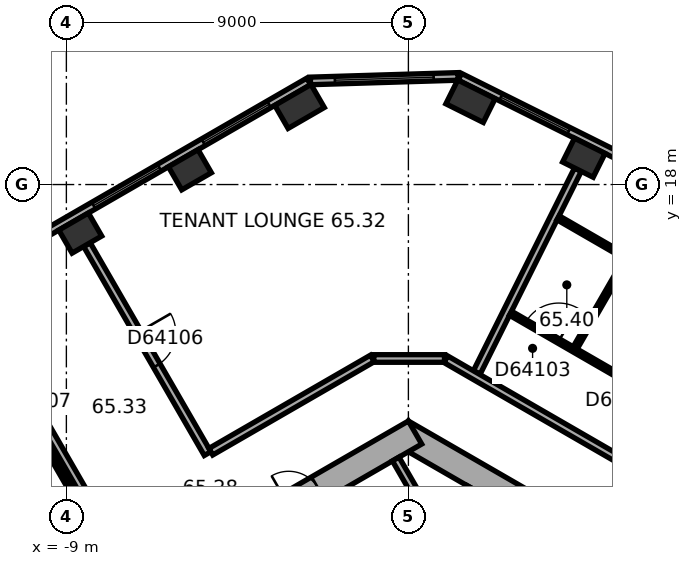
"""IFC4 building model, lengths in metres.
Left out: names, types, materials, properties, quantities, classifications, styles, units other than length and angle.
Written with IfcOpenShell. Run it as: python <this file> out.ifc"""

import sys

from ifc_helpers import new_model, si_unit, direction, frame, frame_2d, origin, origin_2d, place, context, subcontext, project, spatial, rectangle, extrude, element, fill, save


model = new_model("IFC4")
c1 = context("Model", 3, precision=1e-05, world=origin(), true_north=direction((0.0, 1.0)))
c2 = subcontext(c1, "Body", "Model", "MODEL_VIEW")
j1 = project(units=[si_unit("LENGTHUNIT", "METRE"), si_unit("PLANEANGLEUNIT", "RADIAN")], contexts=[c1])
p1 = place(None, origin())
s1 = spatial("IfcSite", under=j1, at=p1, CompositionType="ELEMENT")
p2 = place(p1, origin())
s2 = spatial("IfcBuilding", under=s1, at=p2, CompositionType="ELEMENT")
p3 = place(p2, frame((0.0, 0.0, 263.5)))
s3 = spatial("IfcBuildingStorey", under=s2, at=p3, CompositionType="ELEMENT", Elevation=263.5)
p4 = place(p3, frame((4.616, 18.706, 0.0), z_axis=(0.0, 0.0, 1.0), x_axis=(-0.894934361602, 0.44619781311, 0.0)))
e1 = element("IfcColumn", 1, at=p4, inside=s3, PredefinedType="COLUMN", context=c2, shape_type="SweptSolid", body=[
    extrude(rectangle(XDim=0.9, YDim=0.7, at=origin_2d()), origin(), (0.0, 0.0, 1.0), 3.7),
])
for number, where, z_axis, x_axis in (
    (2, (1.635, 20.192, 0.0), (0.0, 0.0, 1.0), (-0.895, 0.446, 0.0)),
    (3, (-2.864, 20.055, 0.0), (0.0, 0.0, 1.0), (-0.866, -0.5, 0.0)),
):
    element("IfcColumn", number, at=place(p3, frame(where, z_axis=z_axis, x_axis=x_axis)), inside=s3, PredefinedType="COLUMN", context=c2, shape_type="SweptSolid", body=[
        extrude(rectangle(XDim=1.1, YDim=0.7, at=origin_2d()), origin(), (0.0, 0.0, 1.0), 3.7),
    ])
for number, where, z_axis, x_axis in (
    (4, (-5.75, 18.389, 0.0), (0.0, 0.0, 1.0), (-0.866, -0.5, 0.0)),
    (5, (-8.635, 16.723, 0.0), (0.0, 0.0, 1.0), (-0.866, -0.5, 0.0)),
):
    element("IfcColumn", number, at=place(p3, frame(where, z_axis=z_axis, x_axis=x_axis)), inside=s3, PredefinedType="COLUMN", context=c2, shape_type="SweptSolid", body=[
        extrude(rectangle(XDim=0.9, YDim=0.7, at=origin_2d()), origin(), (0.0, 0.0, 1.0), 3.7),
    ])
p5 = place(p3, frame((10.025, 5.586, 0.0), z_axis=(0.0, 0.0, 1.0), x_axis=(-0.866026453023, 0.499998182661, 0.0)))
e6 = element("IfcWall", 6, at=p5, inside=s3, PredefinedType="SHEAR", context=c2, shape_type="SweptSolid", body=[
    extrude(rectangle(XDim=11.778, YDim=0.7, at=frame_2d((5.889, 0.0))), origin(), (0.0, 0.0, 1.0), 3.7),
])
p6 = place(p5, frame((5.139, 0.0, 0.0)))
e7 = element("IfcOpeningElement", 7, at=p6, cuts=e6, PredefinedType="OPENING", context=c2, shape_type="SweptSolid", body=[
    extrude(rectangle(XDim=0.9, YDim=2.1, at=frame_2d((0.45, 1.05))), frame((0.0, 0.36, 0.0), z_axis=(0.0, -1.0, 0.0), x_axis=(1.0, 0.0, 0.0)), (0.0, 0.0, 1.0), 0.72),
])
p7 = place(p3, frame((0.175, 11.475, 0.0), z_axis=(0.0, 0.0, 1.0), x_axis=(-0.866026453023, -0.499998182661, 0.0)))
e8 = element("IfcWall", 8, at=p7, inside=s3, PredefinedType="SHEAR", context=c2, shape_type="SweptSolid", body=[
    extrude(rectangle(XDim=11.778, YDim=0.7, at=frame_2d((5.889, 0.0))), origin(), (0.0, 0.0, 1.0), 3.7),
])
p8 = place(p7, frame((6.089, 0.0, 0.0)))
e9 = element("IfcOpeningElement", 9, at=p8, cuts=e8, PredefinedType="OPENING", context=c2, shape_type="SweptSolid", body=[
    extrude(rectangle(XDim=1.5, YDim=2.1, at=frame_2d((0.75, 1.05))), frame((0.0, 0.36, 0.0), z_axis=(0.0, -1.0, 0.0), x_axis=(1.0, 0.0, 0.0)), (0.0, 0.0, 1.0), 0.72),
])
p9 = place(p7, frame((2.939, 0.0, 0.0)))
e10 = element("IfcOpeningElement", 10, at=p9, cuts=e8, PredefinedType="OPENING", context=c2, shape_type="SweptSolid", body=[
    extrude(rectangle(XDim=0.9, YDim=2.1, at=frame_2d((0.45, 1.05))), frame((0.0, 0.36, 0.0), z_axis=(0.0, -1.0, 0.0), x_axis=(1.0, 0.0, 0.0)), (0.0, 0.0, 1.0), 0.72),
])
p10 = place(p3, frame((17.223, 12.923, 0.0), z_axis=(0.0, 0.0, 1.0), x_axis=(-0.894930561148, 0.44620543556, 0.0)))
e11 = element("IfcWall", 11, at=p10, inside=s3, PredefinedType="STANDARD", context=c2, shape_type="SweptSolid", body=[
    extrude(rectangle(XDim=17.731, YDim=0.2, at=frame_2d((8.866, 0.0))), origin(), (0.0, 0.0, 1.0), 3.7),
])
p11 = place(p10, frame((1.202, 0.0, 0.9)))
e12 = element("IfcOpeningElement", 12, at=p11, cuts=e11, PredefinedType="OPENING", context=c2, shape_type="SweptSolid", body=[
    extrude(rectangle(XDim=2.0, YDim=2.0, at=frame_2d((1.0, 1.0))), frame((0.0, 0.11, 0.0), z_axis=(0.0, -1.0, 0.0), x_axis=(1.0, 0.0, 0.0)), (0.0, 0.0, 1.0), 0.22),
])
p12 = place(p10, frame((4.533, 0.0, 0.9)))
e13 = element("IfcOpeningElement", 13, at=p12, cuts=e11, PredefinedType="OPENING", context=c2, shape_type="SweptSolid", body=[
    extrude(rectangle(XDim=2.0, YDim=2.0, at=frame_2d((1.0, 1.0))), frame((0.0, 0.11, 0.0), z_axis=(0.0, -1.0, 0.0), x_axis=(1.0, 0.0, 0.0)), (0.0, 0.0, 1.0), 0.22),
])
p13 = place(p10, frame((7.865, 0.0, 0.9)))
e14 = element("IfcOpeningElement", 14, at=p13, cuts=e11, PredefinedType="OPENING", context=c2, shape_type="SweptSolid", body=[
    extrude(rectangle(XDim=2.0, YDim=2.0, at=frame_2d((1.0, 1.0))), frame((0.0, 0.11, 0.0), z_axis=(0.0, -1.0, 0.0), x_axis=(1.0, 0.0, 0.0)), (0.0, 0.0, 1.0), 0.22),
])
p14 = place(p10, frame((11.197, 0.0, 0.9)))
e15 = element("IfcOpeningElement", 15, at=p14, cuts=e11, PredefinedType="OPENING", context=c2, shape_type="SweptSolid", body=[
    extrude(rectangle(XDim=2.0, YDim=2.0, at=frame_2d((1.0, 1.0))), frame((0.0, 0.11, 0.0), z_axis=(0.0, -1.0, 0.0), x_axis=(1.0, 0.0, 0.0)), (0.0, 0.0, 1.0), 0.22),
])
p15 = place(p10, frame((14.528, 0.0, 0.9)))
e16 = element("IfcOpeningElement", 16, at=p15, cuts=e11, PredefinedType="OPENING", context=c2, shape_type="SweptSolid", body=[
    extrude(rectangle(XDim=2.0, YDim=2.0, at=frame_2d((1.0, 1.0))), frame((0.0, 0.11, 0.0), z_axis=(0.0, -1.0, 0.0), x_axis=(1.0, 0.0, 0.0)), (0.0, 0.0, 1.0), 0.22),
])
p16 = place(p3, frame((1.307, 20.845, 0.0), z_axis=(0.0, 0.0, 1.0), x_axis=(-0.999533654813, -0.030536419175, 0.0)))
e17 = element("IfcWall", 17, at=p16, inside=s3, PredefinedType="STANDARD", context=c2, shape_type="SweptSolid", body=[
    extrude(rectangle(XDim=3.885, YDim=0.2, at=frame_2d((1.943, 0.0))), origin(), (0.0, 0.0, 1.0), 3.7),
])
p17 = place(p16, frame((0.643, 0.0, 0.9)))
e18 = element("IfcOpeningElement", 18, at=p17, cuts=e17, PredefinedType="OPENING", context=c2, shape_type="SweptSolid", body=[
    extrude(rectangle(XDim=2.6, YDim=2.0, at=frame_2d((1.3, 1.0))), frame((0.0, 0.11, 0.0), z_axis=(0.0, -1.0, 0.0), x_axis=(1.0, 0.0, 0.0)), (0.0, 0.0, 1.0), 0.22),
])
p18 = place(p3, frame((-2.624, 20.713, 0.0), z_axis=(0.0, 0.0, 1.0), x_axis=(-0.866026460444, -0.499998169808, 0.0)))
e19 = element("IfcWall", 19, at=p18, inside=s3, PredefinedType="STANDARD", context=c2, shape_type="SweptSolid", body=[
    extrude(rectangle(XDim=17.731, YDim=0.2, at=frame_2d((8.866, 0.0))), origin(), (0.0, 0.0, 1.0), 3.7),
])
p19 = place(p18, frame((1.203, 0.0, 0.9)))
e20 = element("IfcOpeningElement", 20, at=p19, cuts=e19, PredefinedType="OPENING", context=c2, shape_type="SweptSolid", body=[
    extrude(rectangle(XDim=2.0, YDim=2.0, at=frame_2d((1.0, 1.0))), frame((0.0, 0.11, 0.0), z_axis=(0.0, -1.0, 0.0), x_axis=(1.0, 0.0, 0.0)), (0.0, 0.0, 1.0), 0.22),
])
p20 = place(p18, frame((4.535, 0.0, 0.9)))
e21 = element("IfcOpeningElement", 21, at=p20, cuts=e19, PredefinedType="OPENING", context=c2, shape_type="SweptSolid", body=[
    extrude(rectangle(XDim=2.0, YDim=2.0, at=frame_2d((1.0, 1.0))), frame((0.0, 0.11, 0.0), z_axis=(0.0, -1.0, 0.0), x_axis=(1.0, 0.0, 0.0)), (0.0, 0.0, 1.0), 0.22),
])
p21 = place(p18, frame((7.867, 0.0, 0.9)))
e22 = element("IfcOpeningElement", 22, at=p21, cuts=e19, PredefinedType="OPENING", context=c2, shape_type="SweptSolid", body=[
    extrude(rectangle(XDim=2.0, YDim=2.0, at=frame_2d((1.0, 1.0))), frame((0.0, 0.11, 0.0), z_axis=(0.0, -1.0, 0.0), x_axis=(1.0, 0.0, 0.0)), (0.0, 0.0, 1.0), 0.22),
])
p22 = place(p18, frame((11.198, 0.0, 0.9)))
e23 = element("IfcOpeningElement", 23, at=p22, cuts=e19, PredefinedType="OPENING", context=c2, shape_type="SweptSolid", body=[
    extrude(rectangle(XDim=2.0, YDim=2.0, at=frame_2d((1.0, 1.0))), frame((0.0, 0.11, 0.0), z_axis=(0.0, -1.0, 0.0), x_axis=(1.0, 0.0, 0.0)), (0.0, 0.0, 1.0), 0.22),
])
p23 = place(p18, frame((14.53, 0.0, 0.9)))
e24 = element("IfcOpeningElement", 24, at=p23, cuts=e19, PredefinedType="OPENING", context=c2, shape_type="SweptSolid", body=[
    extrude(rectangle(XDim=2.0, YDim=2.0, at=frame_2d((1.0, 1.0))), frame((0.0, 0.11, 0.0), z_axis=(0.0, -1.0, 0.0), x_axis=(1.0, 0.0, 0.0)), (0.0, 0.0, 1.0), 0.22),
])
p24 = place(p3, frame((0.532, 8.122, 0.0), z_axis=(0.0, 0.0, 1.0), x_axis=(0.500077893725, 0.86598042715, 0.0)))
e25 = element("IfcWall", 25, at=p24, inside=s3, PredefinedType="PARTITIONING", context=c2, shape_type="SweptSolid", body=[
    extrude(rectangle(XDim=2.2, YDim=0.2, at=frame_2d((1.1, 0.0))), origin(), (0.0, 0.0, 1.0), 3.42),
])
p25 = place(p3, frame((0.767, 8.872, 0.0), z_axis=(0.0, 0.0, 1.0), x_axis=(-0.499994660107, 0.866028486751, 0.0)))
e26 = element("IfcWall", 26, at=p25, inside=s3, PredefinedType="PARTITIONING", context=c2, shape_type="SweptSolid", body=[
    extrude(rectangle(XDim=2.2, YDim=0.2, at=frame_2d((1.1, 0.0))), origin(), (0.0, 0.0, 1.0), 3.42),
])
p26 = place(p3, frame((-11.345, 14.754, 0.0), z_axis=(0.0, 0.0, 1.0), x_axis=(0.500005339912, -0.866022320763, 0.0)))
e27 = element("IfcWall", 27, at=p26, inside=s3, PredefinedType="PARTITIONING", context=c2, shape_type="SweptSolid", body=[
    extrude(rectangle(XDim=6.35, YDim=0.2, at=frame_2d((3.175, 0.0))), origin(), (0.0, 0.0, 1.0), 3.42),
])
p27 = place(p26, frame((2.675, 0.0, 0.0)))
e28 = element("IfcOpeningElement", 28, at=p27, cuts=e27, PredefinedType="OPENING", context=c2, shape_type="SweptSolid", body=[
    extrude(rectangle(XDim=1.0, YDim=2.1, at=frame_2d((0.5, 1.05))), frame((0.0, 0.11, 0.0), z_axis=(0.0, -1.0, 0.0), x_axis=(1.0, 0.0, 0.0)), (0.0, 0.0, 1.0), 0.22),
])
p28 = place(p3, frame((-9.557, 11.156, 0.0), z_axis=(0.0, 0.0, 1.0), x_axis=(0.49994888933, -0.866054910533, 0.0)))
e29 = element("IfcWall", 29, at=p28, inside=s3, PredefinedType="PARTITIONING", context=c2, shape_type="SweptSolid", body=[
    extrude(rectangle(XDim=2.24, YDim=0.12, at=frame_2d((1.12, 0.0))), origin(), (0.0, 0.0, 1.0), 3.42),
])
p29 = place(p3, frame((-8.46, 16.42, 0.0), z_axis=(0.0, 0.0, 1.0), x_axis=(0.500005339912, -0.866022320763, 0.0)))
e30 = element("IfcWall", 30, at=p29, inside=s3, PredefinedType="PARTITIONING", context=c2, shape_type="SweptSolid", body=[
    extrude(rectangle(XDim=6.35, YDim=0.2, at=frame_2d((3.175, 0.0))), origin(), (0.0, 0.0, 1.0), 2.87),
])
p30 = place(p29, frame((2.675, 0.0, 0.0)))
e31 = element("IfcOpeningElement", 31, at=p30, cuts=e30, PredefinedType="OPENING", context=c2, shape_type="SweptSolid", body=[
    extrude(rectangle(XDim=1.0, YDim=2.1, at=frame_2d((0.5, 1.05))), frame((0.0, 0.11, 0.0), z_axis=(0.0, -1.0, 0.0), x_axis=(1.0, 0.0, 0.0)), (0.0, 0.0, 1.0), 0.22),
])
p31 = place(p3, frame((-0.95, 13.423, 0.0), z_axis=(0.0, 0.0, 1.0), x_axis=(-0.86603557629, -0.499982380289, 0.0)))
e32 = element("IfcWall", 32, at=p31, inside=s3, PredefinedType="PARTITIONING", context=c2, shape_type="SweptSolid", body=[
    extrude(rectangle(XDim=4.906, YDim=0.2, at=frame_2d((2.453, 0.0))), origin(), (0.0, 0.0, 1.0), 3.42),
])
p32 = place(p3, frame((0.95, 13.423, 0.0), z_axis=(0.0, 0.0, 1.0), x_axis=(-1.0, 0.0, 0.0)))
e33 = element("IfcWall", 33, at=p32, inside=s3, PredefinedType="PARTITIONING", context=c2, shape_type="SweptSolid", body=[
    extrude(rectangle(XDim=1.86, YDim=0.2, at=frame_2d((0.93, 0.0))), origin(), (0.0, 0.0, 1.0), 3.42),
])
p33 = place(p3, frame((4.388, 13.702, 0.0), z_axis=(0.0, 0.0, 1.0), x_axis=(0.500048966069, 0.865997131366, 0.0)))
e34 = element("IfcWall", 34, at=p33, inside=s3, PredefinedType="PARTITIONING", context=c2, shape_type="SweptSolid", body=[
    extrude(rectangle(XDim=2.74, YDim=0.12, at=frame_2d((1.37, 0.0))), origin(), (0.0, 0.0, 1.0), 3.42),
])
p34 = place(p3, frame((4.46, 18.392, 0.0), z_axis=(0.0, 0.0, 1.0), x_axis=(-0.446197360024, -0.894934587502, 0.0)))
e35 = element("IfcWall", 35, at=p34, inside=s3, PredefinedType="PARTITIONING", context=c2, shape_type="SweptSolid", body=[
    extrude(rectangle(XDim=5.96, YDim=0.2, at=frame_2d((2.98, 0.0))), origin(), (0.0, 0.0, 1.0), 2.87),
])
p35 = place(p3, frame((5.706, 16.104, 0.0), z_axis=(0.0, 0.0, 1.0), x_axis=(-0.866040114423, 0.499974519561, 0.0)))
e36 = element("IfcWall", 36, at=p35, inside=s3, PredefinedType="PARTITIONING", context=c2, shape_type="SweptSolid", body=[
    extrude(rectangle(XDim=2.04, YDim=0.12, at=frame_2d((1.02, 0.0))), origin(), (0.0, 0.0, 1.0), 3.42),
])
p36 = place(p3, frame((11.15, 7.534, 0.0), z_axis=(0.0, 0.0, 1.0), x_axis=(-0.866026603062, 0.499997922785, 0.0)))
e37 = element("IfcWall", 37, at=p36, inside=s3, PredefinedType="PARTITIONING", context=c2, shape_type="SweptSolid", body=[
    extrude(rectangle(XDim=11.738, YDim=0.2, at=frame_2d((5.869, 0.0))), origin(), (0.0, 0.0, 1.0), 3.42),
])
p37 = place(p36, frame((5.345, 0.0, 0.0)))
e38 = element("IfcOpeningElement", 38, at=p37, cuts=e37, PredefinedType="OPENING", context=c2, shape_type="SweptSolid", body=[
    extrude(rectangle(XDim=1.0, YDim=2.1, at=frame_2d((0.5, 1.05))), frame((0.0, 0.11, 0.0), z_axis=(0.0, -1.0, 0.0), x_axis=(1.0, 0.0, 0.0)), (0.0, 0.0, 1.0), 0.22),
])
p38 = place(p3, frame((11.187, 9.707, 0.0), z_axis=(0.0, 0.0, 1.0), x_axis=(-0.866033133531, 0.499986611447, 0.0)))
e39 = element("IfcWall", 39, at=p38, inside=s3, PredefinedType="PARTITIONING", context=c2, shape_type="SweptSolid", body=[
    extrude(rectangle(XDim=9.814, YDim=0.12, at=frame_2d((4.907, 0.0))), origin(), (0.0, 0.0, 1.0), 3.42),
])
p39 = place(p38, frame((8.349, 0.0, 0.0)))
e40 = element("IfcOpeningElement", 40, at=p39, cuts=e39, PredefinedType="OPENING", context=c2, shape_type="SweptSolid", body=[
    extrude(rectangle(XDim=1.0, YDim=2.1, at=frame_2d((0.5, 1.05))), frame((0.0, 0.07, 0.0), z_axis=(0.0, -1.0, 0.0), x_axis=(1.0, 0.0, 0.0)), (0.0, 0.0, 1.0), 0.14),
])
p40 = place(p38, frame((1.7, 0.0, 0.0)))
e41 = element("IfcOpeningElement", 41, at=p40, cuts=e39, PredefinedType="OPENING", context=c2, shape_type="SweptSolid", body=[
    extrude(rectangle(XDim=0.9, YDim=2.1, at=frame_2d((0.45, 1.05))), frame((0.0, 0.07, 0.0), z_axis=(0.0, -1.0, 0.0), x_axis=(1.0, 0.0, 0.0)), (0.0, 0.0, 1.0), 0.14),
])
p41 = place(p38, frame((5.642, 0.0, 0.0)))
e42 = element("IfcOpeningElement", 42, at=p41, cuts=e39, PredefinedType="OPENING", context=c2, shape_type="SweptSolid", body=[
    extrude(rectangle(XDim=0.9, YDim=2.1, at=frame_2d((0.45, 1.05))), frame((0.0, 0.07, 0.0), z_axis=(0.0, -1.0, 0.0), x_axis=(1.0, 0.0, 0.0)), (0.0, 0.0, 1.0), 0.14),
])
p42 = place(p15, origin())
e43 = element("IfcWindow", 43, at=p42, inside=s3, PartitioningType="SINGLE_PANEL", PredefinedType="WINDOW", context=c2, shape_type="SweptSolid", body=[
    extrude(rectangle(XDim=2.0, YDim=2.0, at=frame_2d((1.0, 1.0))), frame((0.0, 0.03, 0.0), z_axis=(0.0, -1.0, 0.0), x_axis=(1.0, 0.0, 0.0)), (0.0, 0.0, 1.0), 0.06),
])
fill(e16, e43)
p43 = place(p17, origin())
e44 = element("IfcWindow", 44, at=p43, inside=s3, PartitioningType="SINGLE_PANEL", PredefinedType="WINDOW", context=c2, shape_type="SweptSolid", body=[
    extrude(rectangle(XDim=2.6, YDim=2.0, at=frame_2d((1.3, 1.0))), frame((0.0, 0.03, 0.0), z_axis=(0.0, -1.0, 0.0), x_axis=(1.0, 0.0, 0.0)), (0.0, 0.0, 1.0), 0.06),
])
fill(e18, e44)
p44 = place(p19, origin())
e45 = element("IfcWindow", 45, at=p44, inside=s3, PartitioningType="SINGLE_PANEL", PredefinedType="WINDOW", context=c2, shape_type="SweptSolid", body=[
    extrude(rectangle(XDim=2.0, YDim=2.0, at=frame_2d((1.0, 1.0))), frame((0.0, 0.03, 0.0), z_axis=(0.0, -1.0, 0.0), x_axis=(1.0, 0.0, 0.0)), (0.0, 0.0, 1.0), 0.06),
])
fill(e20, e45)
p45 = place(p20, origin())
e46 = element("IfcWindow", 46, at=p45, inside=s3, PartitioningType="SINGLE_PANEL", PredefinedType="WINDOW", context=c2, shape_type="SweptSolid", body=[
    extrude(rectangle(XDim=2.0, YDim=2.0, at=frame_2d((1.0, 1.0))), frame((0.0, 0.03, 0.0), z_axis=(0.0, -1.0, 0.0), x_axis=(1.0, 0.0, 0.0)), (0.0, 0.0, 1.0), 0.06),
])
fill(e21, e46)
p46 = place(p39, origin())
e47 = element("IfcDoor", 47, at=p46, inside=s3, OperationType="SINGLE_SWING_LEFT", PredefinedType="DOOR", context=c2, shape_type="SweptSolid", body=[
    extrude(rectangle(XDim=1.0, YDim=2.1, at=frame_2d((0.5, 1.05))), frame((0.0, 0.025, 0.0), z_axis=(0.0, -1.0, 0.0), x_axis=(1.0, 0.0, 0.0)), (0.0, 0.0, 1.0), 0.05),
])
fill(e40, e47)
p47 = place(p30, origin())
e48 = element("IfcDoor", 48, at=p47, inside=s3, OperationType="SINGLE_SWING_LEFT", PredefinedType="DOOR", context=c2, shape_type="SweptSolid", body=[
    extrude(rectangle(XDim=1.0, YDim=2.1, at=frame_2d((0.5, 1.05))), frame((0.0, 0.025, 0.0), z_axis=(0.0, -1.0, 0.0), x_axis=(1.0, 0.0, 0.0)), (0.0, 0.0, 1.0), 0.05),
])
fill(e31, e48)
save(model, sys.argv[1])
